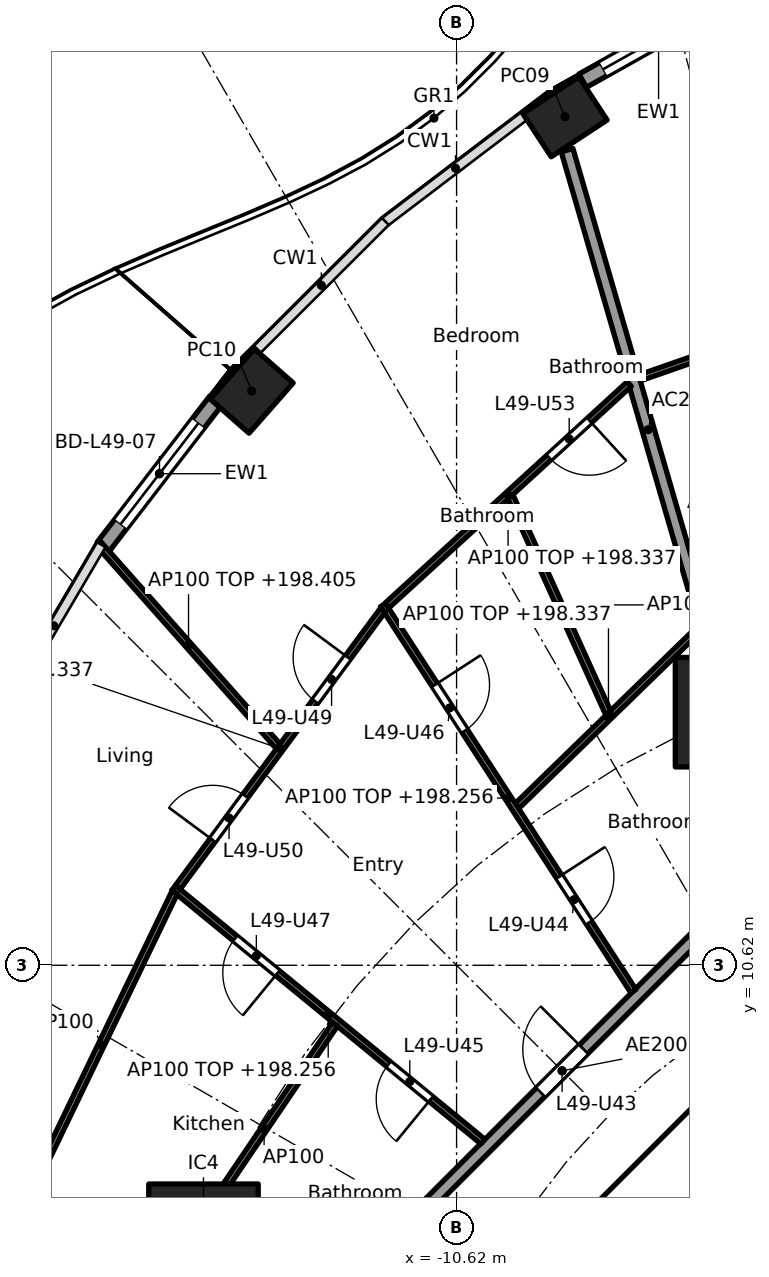
"""IFC4 building model, lengths in metres.
Left out: names, types, materials, properties, quantities, classifications, styles, units other than length and angle.
Written with IfcOpenShell. Run it as: python <this file> out.ifc"""

import sys

from ifc_helpers import new_model, si_unit, direction, frame, frame_2d, origin, origin_2d, place, context, subcontext, project, spatial, rectangle, hollow_rectangle, extrude, element, fill, save


model = new_model("IFC4")
c1 = context("Model", 3, precision=1e-05, world=origin(), true_north=direction((0.0, 1.0)))
c2 = subcontext(c1, "Body", "Model", "MODEL_VIEW")
j1 = project(units=[si_unit("LENGTHUNIT", "METRE"), si_unit("PLANEANGLEUNIT", "RADIAN")], contexts=[c1])
p1 = place(None, origin())
s1 = spatial("IfcSite", under=j1, at=p1, CompositionType="ELEMENT")
p2 = place(p1, origin())
s2 = spatial("IfcBuilding", under=s1, at=p2, CompositionType="ELEMENT")
p3 = place(p2, frame((0.0, 0.0, 195.5)))
s3 = spatial("IfcBuildingStorey", under=s2, at=p3, CompositionType="ELEMENT", Elevation=195.5)
for number, where, z_axis, x_axis in (
    (1, (-8.837, 24.573, 0.0), (0.0, 0.0, 1.0), (-0.836, -0.549, 0.0)),
    (2, (-13.989, 20.064, 0.0), (0.0, 0.0, 1.0), (-0.66, -0.751, 0.0)),
):
    element("IfcColumn", number, at=place(p3, frame(where, z_axis=z_axis, x_axis=x_axis)), inside=s3, PredefinedType="COLUMN", context=c2, shape_type="SweptSolid", body=[
        extrude(hollow_rectangle(XDim=1.1, YDim=0.85, WallThickness=0.036, at=origin_2d()), origin(), (0.0, 0.0, 1.0), 3.7),
    ])
for number, where, z_axis, x_axis in (
    (3, (-6.123, 14.782, 0.0), (0.0, 0.0, 1.0), (1.0, 0.0, 0.0)),
    (4, (-14.782, 6.123, 0.0), (0.0, 0.0, 1.0), (1.0, 0.0, 0.0)),
):
    element("IfcColumn", number, at=place(p3, frame(where, z_axis=z_axis, x_axis=x_axis)), inside=s3, PredefinedType="COLUMN", context=c2, shape_type="SweptSolid", body=[
        extrude(rectangle(XDim=1.8, YDim=1.8, at=origin_2d()), origin(), (0.0, 0.0, 1.0), 3.7),
    ])
p4 = place(p3, frame((-8.547, 25.167, 0.0), z_axis=(0.0, 0.0, 1.0), x_axis=(0.872078262455, 0.489366431371, 0.0)))
e5 = element("IfcWall", 5, at=p4, inside=s3, PredefinedType="SOLIDWALL", context=c2, shape_type="SweptSolid", body=[
    extrude(rectangle(XDim=2.864, YDim=0.25, at=frame_2d((1.432, 0.0))), origin(), (0.0, 0.0, 1.0), 3.44),
])
p5 = place(p4, frame((0.382, 0.0, 0.0)))
e6 = element("IfcOpeningElement", 6, at=p5, cuts=e5, PredefinedType="OPENING", context=c2, shape_type="SweptSolid", body=[
    extrude(rectangle(XDim=2.1, YDim=2.4, at=frame_2d((1.05, 1.2))), frame((0.0, 0.135, 0.0), z_axis=(0.0, -1.0, 0.0), x_axis=(1.0, 0.0, 0.0)), (0.0, 0.0, 1.0), 0.27),
])
p6 = place(p3, frame((-16.432, 17.502, 0.0), z_axis=(0.0, 0.0, 1.0), x_axis=(0.610437428894, 0.79206448311, 0.0)))
e7 = element("IfcWall", 7, at=p6, inside=s3, PredefinedType="SOLIDWALL", context=c2, shape_type="SweptSolid", body=[
    extrude(rectangle(XDim=3.035, YDim=0.25, at=frame_2d((1.518, 0.0))), origin(), (0.0, 0.0, 1.0), 3.44),
])
p7 = place(p6, frame((0.468, 0.0, 0.0)))
e8 = element("IfcOpeningElement", 8, at=p7, cuts=e7, PredefinedType="OPENING", context=c2, shape_type="SweptSolid", body=[
    extrude(rectangle(XDim=2.1, YDim=2.4, at=frame_2d((1.05, 1.2))), frame((0.0, 0.135, 0.0), z_axis=(0.0, -1.0, 0.0), x_axis=(1.0, 0.0, 0.0)), (0.0, 0.0, 1.0), 0.27),
])
p8 = place(p3, frame((-4.613, 9.988, 0.0), z_axis=(0.0, 0.0, 1.0), x_axis=(-0.707106781187, -0.707106781187, 0.0)))
e9 = element("IfcWall", 9, at=p8, inside=s3, PredefinedType="SHEAR", context=c2, shape_type="SweptSolid", body=[
    extrude(rectangle(XDim=7.602, YDim=0.6, at=frame_2d((3.801, 0.0))), origin(), (0.0, 0.0, 1.0), 3.44),
])
p9 = place(p8, frame((0.351, 0.0, 0.0)))
e10 = element("IfcOpeningElement", 10, at=p9, cuts=e9, PredefinedType="OPENING", context=c2, shape_type="SweptSolid", body=[
    extrude(rectangle(XDim=1.1, YDim=2.1, at=frame_2d((0.55, 1.05))), frame((0.0, 0.31, 0.0), z_axis=(0.0, -1.0, 0.0), x_axis=(1.0, 0.0, 0.0)), (0.0, 0.0, 1.0), 0.62),
])
p10 = place(p3, frame((-6.137, 14.83, 0.0), z_axis=(0.0, 0.0, 1.0), x_axis=(-0.278461169897, 0.96044748782, 0.0)))
e11 = element("IfcWall", 11, at=p10, inside=s3, PredefinedType="PARTITIONING", context=c2, shape_type="SweptSolid", body=[
    extrude(rectangle(XDim=9.573, YDim=0.2, at=frame_2d((4.787, 0.0))), origin(), (0.0, 0.0, 1.0), 2.837),
])
p11 = place(p3, frame((-5.275, 12.494, 0.0), z_axis=(0.0, 0.0, 1.0), x_axis=(-0.707106781187, -0.707106781187, 0.0)))
e12 = element("IfcWall", 12, at=p11, inside=s3, PredefinedType="PARTITIONING", context=c2, shape_type="SweptSolid", body=[
    extrude(rectangle(XDim=10.209, YDim=0.2, at=frame_2d((5.104, 0.0))), origin(), (0.0, 0.0, 1.0), 3.44),
])
p12 = place(p11, frame((4.604, 0.0, 0.0)))
e13 = element("IfcOpeningElement", 13, at=p12, cuts=e12, PredefinedType="OPENING", context=c2, shape_type="SweptSolid", body=[
    extrude(rectangle(XDim=1.0, YDim=2.1, at=frame_2d((0.5, 1.05))), frame((0.0, 0.11, 0.0), z_axis=(0.0, -1.0, 0.0), x_axis=(1.0, 0.0, 0.0)), (0.0, 0.0, 1.0), 0.22),
])
p13 = place(p3, frame((-2.546, 22.051, 0.0), z_axis=(0.0, 0.0, 1.0), x_axis=(-0.94391294884, -0.330194404878, 0.0)))
e14 = element("IfcWall", 14, at=p13, inside=s3, PredefinedType="PARTITIONING", context=c2, shape_type="SweptSolid", body=[
    extrude(rectangle(XDim=5.367, YDim=0.1, at=frame_2d((2.684, 0.0))), origin(), (0.0, 0.0, 1.0), 2.837),
])
p14 = place(p13, frame((2.234, 0.0, 0.0)))
e15 = element("IfcOpeningElement", 15, at=p14, cuts=e14, PredefinedType="OPENING", context=c2, shape_type="SweptSolid", body=[
    extrude(rectangle(XDim=0.9, YDim=2.1, at=frame_2d((0.45, 1.05))), frame((0.0, 0.06, 0.0), z_axis=(0.0, -1.0, 0.0), x_axis=(1.0, 0.0, 0.0)), (0.0, 0.0, 1.0), 0.12),
])
p15 = place(p3, frame((-6.616, 16.166, 0.0), z_axis=(0.0, 0.0, 1.0), x_axis=(-0.716919058692, -0.697156412352, 0.0)))
e16 = element("IfcWall", 16, at=p15, inside=s3, PredefinedType="PARTITIONING", context=c2, shape_type="SweptSolid", body=[
    extrude(rectangle(XDim=4.2, YDim=0.1, at=frame_2d((2.1, 0.0))), origin(), (0.0, 0.0, 1.0), 2.837),
])
p16 = place(p3, frame((-7.781, 20.178, 0.0), z_axis=(0.0, 0.0, 1.0), x_axis=(-0.73807320557, -0.674720640872, 0.0)))
e17 = element("IfcWall", 17, at=p16, inside=s3, PredefinedType="PARTITIONING", context=c2, shape_type="SweptSolid", body=[
    extrude(rectangle(XDim=5.399, YDim=0.1, at=frame_2d((2.699, 0.0))), origin(), (0.0, 0.0, 1.0), 2.837),
])
p17 = place(p16, frame((0.887, 0.0, 0.0)))
e18 = element("IfcOpeningElement", 18, at=p17, cuts=e17, PredefinedType="OPENING", context=c2, shape_type="SweptSolid", body=[
    extrude(rectangle(XDim=0.9, YDim=2.1, at=frame_2d((0.45, 1.05))), frame((0.0, 0.06, 0.0), z_axis=(0.0, -1.0, 0.0), x_axis=(1.0, 0.0, 0.0)), (0.0, 0.0, 1.0), 0.12),
])
p18 = place(p3, frame((-8.125, 14.765, 0.0), z_axis=(0.0, 0.0, 1.0), x_axis=(-0.411745679848, 0.911298795745, 0.0)))
e19 = element("IfcWall", 19, at=p18, inside=s3, PredefinedType="PARTITIONING", context=c2, shape_type="SweptSolid", body=[
    extrude(rectangle(XDim=3.909, YDim=0.1, at=frame_2d((1.955, 0.0))), origin(), (0.0, 0.0, 1.0), 3.44),
])
p19 = place(p3, frame((-7.712, 10.195, 0.0), z_axis=(0.0, 0.0, 1.0), x_axis=(-0.544179442551, 0.838968851809, 0.0)))
e20 = element("IfcWall", 20, at=p19, inside=s3, PredefinedType="PARTITIONING", context=c2, shape_type="SweptSolid", body=[
    extrude(rectangle(XDim=7.566, YDim=0.1, at=frame_2d((3.783, 0.0))), origin(), (0.0, 0.0, 1.0), 2.756),
])
p20 = place(p19, frame((1.343, 0.0, 0.0)))
e21 = element("IfcOpeningElement", 21, at=p20, cuts=e20, PredefinedType="OPENING", context=c2, shape_type="SweptSolid", body=[
    extrude(rectangle(XDim=0.9, YDim=2.1, at=frame_2d((0.45, 1.05))), frame((0.0, 0.06, 0.0), z_axis=(0.0, -1.0, 0.0), x_axis=(1.0, 0.0, 0.0)), (0.0, 0.0, 1.0), 0.12),
])
p21 = place(p19, frame((5.101, 0.0, 0.0)))
e22 = element("IfcOpeningElement", 22, at=p21, cuts=e20, PredefinedType="OPENING", context=c2, shape_type="SweptSolid", body=[
    extrude(rectangle(XDim=0.9, YDim=2.1, at=frame_2d((0.45, 1.05))), frame((0.0, 0.06, 0.0), z_axis=(0.0, -1.0, 0.0), x_axis=(1.0, 0.0, 0.0)), (0.0, 0.0, 1.0), 0.12),
])
p22 = place(p3, frame((-11.832, 16.461, 0.0), z_axis=(0.0, 0.0, 1.0), x_axis=(-0.594704483906, -0.803944386647, 0.0)))
e23 = element("IfcWall", 23, at=p22, inside=s3, PredefinedType="PARTITIONING", context=c2, shape_type="SweptSolid", body=[
    extrude(rectangle(XDim=5.672, YDim=0.1, at=frame_2d((2.836, 0.0))), origin(), (0.0, 0.0, 1.0), 2.837),
])
p23 = place(p22, frame((0.968, 0.0, 0.0)))
e24 = element("IfcOpeningElement", 24, at=p23, cuts=e23, PredefinedType="OPENING", context=c2, shape_type="SweptSolid", body=[
    extrude(rectangle(XDim=0.9, YDim=2.1, at=frame_2d((0.45, 1.05))), frame((0.0, 0.06, 0.0), z_axis=(0.0, -1.0, 0.0), x_axis=(1.0, 0.0, 0.0)), (0.0, 0.0, 1.0), 0.12),
])
p24 = place(p22, frame((3.804, 0.0, 0.0)))
e25 = element("IfcOpeningElement", 25, at=p24, cuts=e23, PredefinedType="OPENING", context=c2, shape_type="SweptSolid", body=[
    extrude(rectangle(XDim=0.9, YDim=2.1, at=frame_2d((0.45, 1.05))), frame((0.0, 0.06, 0.0), z_axis=(0.0, -1.0, 0.0), x_axis=(1.0, 0.0, 0.0)), (0.0, 0.0, 1.0), 0.12),
])
p25 = place(p3, frame((-13.552, 14.219, 0.0), z_axis=(0.0, 0.0, 1.0), x_axis=(-0.663542794709, 0.748138329181, 0.0)))
e26 = element("IfcWall", 26, at=p25, inside=s3, PredefinedType="PARTITIONING", context=c2, shape_type="SweptSolid", body=[
    extrude(rectangle(XDim=4.45, YDim=0.1, at=frame_2d((2.225, 0.0))), origin(), (0.0, 0.0, 1.0), 2.905),
])
p26 = place(p3, frame((-10.189, 7.721, 0.0), z_axis=(0.0, 0.0, 1.0), x_axis=(-0.773121441079, 0.634258021112, 0.0)))
e27 = element("IfcWall", 27, at=p26, inside=s3, PredefinedType="PARTITIONING", context=c2, shape_type="SweptSolid", body=[
    extrude(rectangle(XDim=6.577, YDim=0.1, at=frame_2d((3.289, 0.0))), origin(), (0.0, 0.0, 1.0), 2.756),
])
p27 = place(p26, frame((1.104, 0.0, 0.0)))
e28 = element("IfcOpeningElement", 28, at=p27, cuts=e27, PredefinedType="OPENING", context=c2, shape_type="SweptSolid", body=[
    extrude(rectangle(XDim=0.9, YDim=2.1, at=frame_2d((0.45, 1.05))), frame((0.0, 0.06, 0.0), z_axis=(0.0, -1.0, 0.0), x_axis=(1.0, 0.0, 0.0)), (0.0, 0.0, 1.0), 0.12),
])
p28 = place(p26, frame((4.367, 0.0, 0.0)))
e29 = element("IfcOpeningElement", 29, at=p28, cuts=e27, PredefinedType="OPENING", context=c2, shape_type="SweptSolid", body=[
    extrude(rectangle(XDim=0.9, YDim=2.1, at=frame_2d((0.45, 1.05))), frame((0.0, 0.06, 0.0), z_axis=(0.0, -1.0, 0.0), x_axis=(1.0, 0.0, 0.0)), (0.0, 0.0, 1.0), 0.12),
])
p29 = place(p3, frame((-12.619, 9.65, 0.0), z_axis=(0.0, 0.0, 1.0), x_axis=(-0.561064907171, -0.827771810308, 0.0)))
e30 = element("IfcWall", 30, at=p29, inside=s3, PredefinedType="PARTITIONING", context=c2, shape_type="SweptSolid", body=[
    extrude(rectangle(XDim=4.159, YDim=0.1, at=frame_2d((2.079, 0.0))), origin(), (0.0, 0.0, 1.0), 3.44),
])
p30 = place(p3, frame((-15.257, 11.816, 0.0), z_axis=(0.0, 0.0, 1.0), x_axis=(-0.434040130629, -0.900893536997, 0.0)))
e31 = element("IfcWall", 31, at=p30, inside=s3, PredefinedType="PARTITIONING", context=c2, shape_type="SweptSolid", body=[
    extrude(rectangle(XDim=5.558, YDim=0.1, at=frame_2d((2.779, 0.0))), origin(), (0.0, 0.0, 1.0), 3.44),
])
p31 = place(p5, origin())
e32 = element("IfcDoor", 32, at=p31, inside=s3, OperationType="SLIDING_TO_LEFT", PredefinedType="DOOR", context=c2, shape_type="SweptSolid", body=[
    extrude(rectangle(XDim=2.1, YDim=2.4, at=frame_2d((1.05, 1.2))), frame((0.0, 0.025, 0.0), z_axis=(0.0, -1.0, 0.0), x_axis=(1.0, 0.0, 0.0)), (0.0, 0.0, 1.0), 0.05),
])
fill(e6, e32)
p32 = place(p7, origin())
e33 = element("IfcDoor", 33, at=p32, inside=s3, OperationType="SLIDING_TO_LEFT", PredefinedType="DOOR", context=c2, shape_type="SweptSolid", body=[
    extrude(rectangle(XDim=2.1, YDim=2.4, at=frame_2d((1.05, 1.2))), frame((0.0, 0.025, 0.0), z_axis=(0.0, -1.0, 0.0), x_axis=(1.0, 0.0, 0.0)), (0.0, 0.0, 1.0), 0.05),
])
fill(e8, e33)
p33 = place(p12, frame((1.0, 0.0, 0.0), x_axis=(-1.0, 0.0, 0.0)))
e34 = element("IfcDoor", 34, at=p33, inside=s3, OperationType="SINGLE_SWING_RIGHT", PredefinedType="DOOR", context=c2, shape_type="SweptSolid", body=[
    extrude(rectangle(XDim=1.0, YDim=2.1, at=frame_2d((0.5, 1.05))), frame((0.0, 0.025, 0.0), z_axis=(0.0, -1.0, 0.0), x_axis=(1.0, 0.0, 0.0)), (0.0, 0.0, 1.0), 0.05),
])
fill(e13, e34)
p34 = place(p20, frame((0.9, 0.0, 0.0), x_axis=(-1.0, 0.0, 0.0)))
e35 = element("IfcDoor", 35, at=p34, inside=s3, OperationType="SINGLE_SWING_LEFT", PredefinedType="DOOR", context=c2, shape_type="SweptSolid", body=[
    extrude(rectangle(XDim=0.9, YDim=2.1, at=frame_2d((0.45, 1.05))), frame((0.0, 0.025, 0.0), z_axis=(0.0, -1.0, 0.0), x_axis=(1.0, 0.0, 0.0)), (0.0, 0.0, 1.0), 0.05),
])
fill(e21, e35)
p35 = place(p27, origin())
e36 = element("IfcDoor", 36, at=p35, inside=s3, OperationType="SINGLE_SWING_LEFT", PredefinedType="DOOR", context=c2, shape_type="SweptSolid", body=[
    extrude(rectangle(XDim=0.9, YDim=2.1, at=frame_2d((0.45, 1.05))), frame((0.0, 0.025, 0.0), z_axis=(0.0, -1.0, 0.0), x_axis=(1.0, 0.0, 0.0)), (0.0, 0.0, 1.0), 0.05),
])
fill(e28, e36)
p36 = place(p21, frame((0.9, 0.0, 0.0), x_axis=(-1.0, 0.0, 0.0)))
e37 = element("IfcDoor", 37, at=p36, inside=s3, OperationType="SINGLE_SWING_LEFT", PredefinedType="DOOR", context=c2, shape_type="SweptSolid", body=[
    extrude(rectangle(XDim=0.9, YDim=2.1, at=frame_2d((0.45, 1.05))), frame((0.0, 0.025, 0.0), z_axis=(0.0, -1.0, 0.0), x_axis=(1.0, 0.0, 0.0)), (0.0, 0.0, 1.0), 0.05),
])
fill(e22, e37)
p37 = place(p28, origin())
e38 = element("IfcDoor", 38, at=p37, inside=s3, OperationType="SINGLE_SWING_LEFT", PredefinedType="DOOR", context=c2, shape_type="SweptSolid", body=[
    extrude(rectangle(XDim=0.9, YDim=2.1, at=frame_2d((0.45, 1.05))), frame((0.0, 0.025, 0.0), z_axis=(0.0, -1.0, 0.0), x_axis=(1.0, 0.0, 0.0)), (0.0, 0.0, 1.0), 0.05),
])
fill(e29, e38)
p38 = place(p23, frame((0.9, 0.0, 0.0), x_axis=(-1.0, 0.0, 0.0)))
e39 = element("IfcDoor", 39, at=p38, inside=s3, OperationType="SINGLE_SWING_RIGHT", PredefinedType="DOOR", context=c2, shape_type="SweptSolid", body=[
    extrude(rectangle(XDim=0.9, YDim=2.1, at=frame_2d((0.45, 1.05))), frame((0.0, 0.025, 0.0), z_axis=(0.0, -1.0, 0.0), x_axis=(1.0, 0.0, 0.0)), (0.0, 0.0, 1.0), 0.05),
])
fill(e24, e39)
p39 = place(p24, frame((0.9, 0.0, 0.0), x_axis=(-1.0, 0.0, 0.0)))
e40 = element("IfcDoor", 40, at=p39, inside=s3, OperationType="SINGLE_SWING_LEFT", PredefinedType="DOOR", context=c2, shape_type="SweptSolid", body=[
    extrude(rectangle(XDim=0.9, YDim=2.1, at=frame_2d((0.45, 1.05))), frame((0.0, 0.025, 0.0), z_axis=(0.0, -1.0, 0.0), x_axis=(1.0, 0.0, 0.0)), (0.0, 0.0, 1.0), 0.05),
])
fill(e25, e40)
p40 = place(p17, origin())
e41 = element("IfcDoor", 41, at=p40, inside=s3, OperationType="SINGLE_SWING_LEFT", PredefinedType="DOOR", context=c2, shape_type="SweptSolid", body=[
    extrude(rectangle(XDim=0.9, YDim=2.1, at=frame_2d((0.45, 1.05))), frame((0.0, 0.025, 0.0), z_axis=(0.0, -1.0, 0.0), x_axis=(1.0, 0.0, 0.0)), (0.0, 0.0, 1.0), 0.05),
])
fill(e18, e41)
save(model, sys.argv[1])
